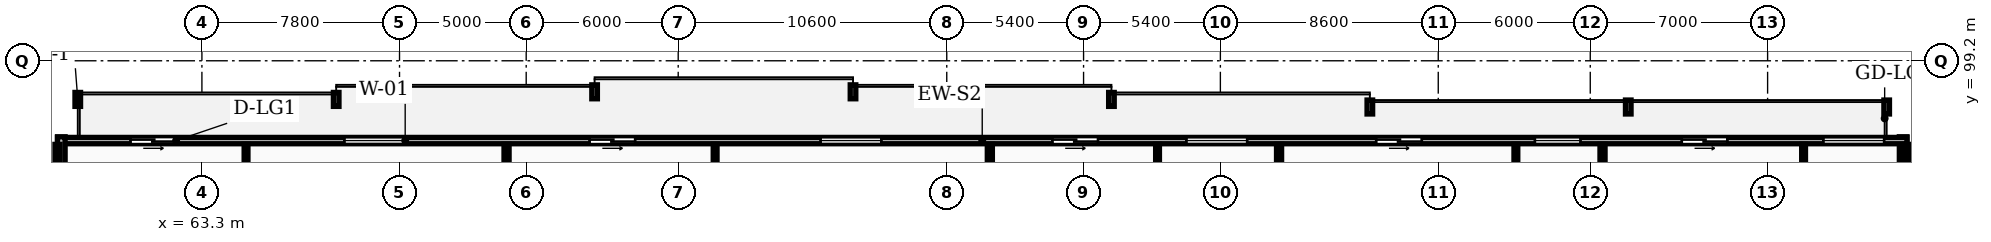
"""IFC4 building model, lengths in metres.
Left out: names, types, materials, properties, quantities, classifications, styles, units other than length and angle.
Written with IfcOpenShell. Run it as: python <this file> out.ifc"""

import sys

from ifc_helpers import new_model, si_unit, direction, frame, frame_2d, origin, place, context, subcontext, project, spatial, rectangle, extrude, element, fill, save


model = new_model("IFC4")
c1 = context("Model", 3, precision=1e-05, world=origin(), true_north=direction((0.0, 1.0)))
c2 = subcontext(c1, "Body", "Model", "MODEL_VIEW")
j1 = project(units=[si_unit("LENGTHUNIT", "METRE"), si_unit("PLANEANGLEUNIT", "RADIAN")], contexts=[c1])
p1 = place(None, origin())
s1 = spatial("IfcSite", under=j1, at=p1, CompositionType="ELEMENT")
p2 = place(p1, origin())
s2 = spatial("IfcBuilding", under=s1, at=p2, CompositionType="ELEMENT")
p3 = place(p2, frame((0.0, 0.0, 106.8)))
s3 = spatial("IfcBuildingStorey", under=s2, at=p3, CompositionType="ELEMENT", Elevation=106.8)
p4 = place(p3, frame((130.45, 92.6, 0.0), z_axis=(0.0, 0.0, 1.0), x_axis=(0.0, 1.0, 0.0)))
e1 = element("IfcWall", 1, at=p4, inside=s3, PredefinedType="STANDARD", context=c2, shape_type="SweptSolid", body=[
    extrude(rectangle(XDim=3.6, YDim=0.3, at=frame_2d((1.8, 0.0))), origin(), (0.0, 0.0, 1.0), 2.97),
])
p5 = place(p3, frame((130.6, 96.05, 0.0), z_axis=(0.0, 0.0, 1.0), x_axis=(-1.0, 0.0, 0.0)))
e2 = element("IfcWall", 2, at=p5, inside=s3, PredefinedType="STANDARD", context=c2, shape_type="SweptSolid", body=[
    extrude(rectangle(XDim=73.0, YDim=0.25, at=frame_2d((36.5, 0.0))), origin(), (0.0, 0.0, 1.0), 2.97),
])
p6 = place(p5, frame((68.319, 0.0, 0.0)))
e3 = element("IfcOpeningElement", 3, at=p6, cuts=e2, PredefinedType="OPENING", context=c2, shape_type="SweptSolid", body=[
    extrude(rectangle(XDim=1.8, YDim=2.2, at=frame_2d((0.9, 1.1))), frame((0.0, 0.135, 0.0), z_axis=(0.0, -1.0, 0.0), x_axis=(1.0, 0.0, 0.0)), (0.0, 0.0, 1.0), 0.27),
])
p7 = place(p5, frame((59.277, 0.0, 0.85)))
e4 = element("IfcOpeningElement", 4, at=p7, cuts=e2, PredefinedType="OPENING", context=c2, shape_type="SweptSolid", body=[
    extrude(rectangle(XDim=2.4, YDim=1.9, at=frame_2d((1.2, 0.95))), frame((0.0, 0.135, 0.0), z_axis=(0.0, -1.0, 0.0), x_axis=(1.0, 0.0, 0.0)), (0.0, 0.0, 1.0), 0.27),
])
p8 = place(p5, frame((50.199, 0.0, 0.0)))
e5 = element("IfcOpeningElement", 5, at=p8, cuts=e2, PredefinedType="OPENING", context=c2, shape_type="SweptSolid", body=[
    extrude(rectangle(XDim=1.8, YDim=2.2, at=frame_2d((0.9, 1.1))), frame((0.0, 0.135, 0.0), z_axis=(0.0, -1.0, 0.0), x_axis=(1.0, 0.0, 0.0)), (0.0, 0.0, 1.0), 0.27),
])
p9 = place(p5, frame((40.481, 0.0, 0.85)))
e6 = element("IfcOpeningElement", 6, at=p9, cuts=e2, PredefinedType="OPENING", context=c2, shape_type="SweptSolid", body=[
    extrude(rectangle(XDim=2.4, YDim=1.9, at=frame_2d((1.2, 0.95))), frame((0.0, 0.135, 0.0), z_axis=(0.0, -1.0, 0.0), x_axis=(1.0, 0.0, 0.0)), (0.0, 0.0, 1.0), 0.27),
])
p10 = place(p5, frame((31.93, 0.0, 0.0)))
e7 = element("IfcOpeningElement", 7, at=p10, cuts=e2, PredefinedType="OPENING", context=c2, shape_type="SweptSolid", body=[
    extrude(rectangle(XDim=1.8, YDim=2.2, at=frame_2d((0.9, 1.1))), frame((0.0, 0.135, 0.0), z_axis=(0.0, -1.0, 0.0), x_axis=(1.0, 0.0, 0.0)), (0.0, 0.0, 1.0), 0.27),
])
p11 = place(p5, frame((26.042, 0.0, 0.85)))
e8 = element("IfcOpeningElement", 8, at=p11, cuts=e2, PredefinedType="OPENING", context=c2, shape_type="SweptSolid", body=[
    extrude(rectangle(XDim=2.4, YDim=1.9, at=frame_2d((1.2, 0.95))), frame((0.0, 0.135, 0.0), z_axis=(0.0, -1.0, 0.0), x_axis=(1.0, 0.0, 0.0)), (0.0, 0.0, 1.0), 0.27),
])
p12 = place(p5, frame((19.15, 0.0, 0.0)))
e9 = element("IfcOpeningElement", 9, at=p12, cuts=e2, PredefinedType="OPENING", context=c2, shape_type="SweptSolid", body=[
    extrude(rectangle(XDim=1.8, YDim=2.2, at=frame_2d((0.9, 1.1))), frame((0.0, 0.135, 0.0), z_axis=(0.0, -1.0, 0.0), x_axis=(1.0, 0.0, 0.0)), (0.0, 0.0, 1.0), 0.27),
])
p13 = place(p5, frame((12.886, 0.0, 0.85)))
e10 = element("IfcOpeningElement", 10, at=p13, cuts=e2, PredefinedType="OPENING", context=c2, shape_type="SweptSolid", body=[
    extrude(rectangle(XDim=1.8, YDim=1.8, at=frame_2d((0.9, 0.9))), frame((0.0, 0.135, 0.0), z_axis=(0.0, -1.0, 0.0), x_axis=(1.0, 0.0, 0.0)), (0.0, 0.0, 1.0), 0.27),
])
p14 = place(p5, frame((7.088, 0.0, 0.0)))
e11 = element("IfcOpeningElement", 11, at=p14, cuts=e2, PredefinedType="OPENING", context=c2, shape_type="SweptSolid", body=[
    extrude(rectangle(XDim=1.8, YDim=2.2, at=frame_2d((0.9, 1.1))), frame((0.0, 0.135, 0.0), z_axis=(0.0, -1.0, 0.0), x_axis=(1.0, 0.0, 0.0)), (0.0, 0.0, 1.0), 0.27),
])
p15 = place(p5, frame((0.9, 0.0, 0.85)))
e12 = element("IfcOpeningElement", 12, at=p15, cuts=e2, PredefinedType="OPENING", context=c2, shape_type="SweptSolid", body=[
    extrude(rectangle(XDim=2.4, YDim=1.9, at=frame_2d((1.2, 0.95))), frame((0.0, 0.135, 0.0), z_axis=(0.0, -1.0, 0.0), x_axis=(1.0, 0.0, 0.0)), (0.0, 0.0, 1.0), 0.27),
])
p16 = place(p3, frame((57.75, 96.2, 0.0), z_axis=(0.0, 0.0, 1.0), x_axis=(0.0, -1.0, 0.0)))
e13 = element("IfcWall", 13, at=p16, inside=s3, PredefinedType="STANDARD", context=c2, shape_type="SweptSolid", body=[
    extrude(rectangle(XDim=3.6, YDim=0.3, at=frame_2d((1.8, 0.0))), origin(), (0.0, 0.0, 1.0), 2.97),
])
for number, where, z_axis, x_axis in (
    (14, (57.6, 69.83, 0.0), (0.0, 0.0, 1.0), (0.0, 1.0, 0.0)),
    (15, (130.6, 69.83, 0.0), (0.0, 0.0, 1.0), (0.0, 1.0, 0.0)),
    (16, (75.325, 69.83, 0.0), (0.0, 0.0, 1.0), (0.0, 1.0, 0.0)),
):
    element("IfcWall", number, at=place(p3, frame(where, z_axis=z_axis, x_axis=x_axis)), inside=s3, PredefinedType="PARTITIONING", context=c2, shape_type="SweptSolid", body=[
        extrude(rectangle(XDim=26.07, YDim=0.2, at=frame_2d((13.035, 0.0))), origin(), (0.0, 0.0, 1.0), 2.97),
    ])
p17 = place(p3, frame((65.042, 90.73, 0.0), z_axis=(0.0, 0.0, 1.0), x_axis=(0.0, 1.0, 0.0)))
e17 = element("IfcWall", 17, at=p17, inside=s3, PredefinedType="PARTITIONING", context=c2, shape_type="SweptSolid", body=[
    extrude(rectangle(XDim=5.17, YDim=0.15, at=frame_2d((2.585, 0.0))), origin(), (0.0, 0.0, 1.0), 2.97),
])
p18 = place(p3, frame((94.401, 69.83, 0.0), z_axis=(0.0, 0.0, 1.0), x_axis=(0.0, 1.0, 0.0)))
e18 = element("IfcWall", 18, at=p18, inside=s3, PredefinedType="PARTITIONING", context=c2, shape_type="SweptSolid", body=[
    extrude(rectangle(XDim=26.07, YDim=0.2, at=frame_2d((13.035, 0.0))), origin(), (0.0, 0.0, 1.0), 2.97),
])
p19 = place(p3, frame((83.558, 90.73, 0.0), z_axis=(0.0, 0.0, 1.0), x_axis=(0.0, 1.0, 0.0)))
e19 = element("IfcWall", 19, at=p19, inside=s3, PredefinedType="PARTITIONING", context=c2, shape_type="SweptSolid", body=[
    extrude(rectangle(XDim=5.17, YDim=0.15, at=frame_2d((2.585, 0.0))), origin(), (0.0, 0.0, 1.0), 2.97),
])
p20 = place(p3, frame((105.817, 69.83, 0.0), z_axis=(0.0, 0.0, 1.0), x_axis=(0.0, 1.0, 0.0)))
e20 = element("IfcWall", 20, at=p20, inside=s3, PredefinedType="PARTITIONING", context=c2, shape_type="SweptSolid", body=[
    extrude(rectangle(XDim=26.07, YDim=0.2, at=frame_2d((13.035, 0.0))), origin(), (0.0, 0.0, 1.0), 2.97),
])
p21 = place(p3, frame((101.02, 85.59, 0.0), z_axis=(0.0, 0.0, 1.0), x_axis=(0.0, 1.0, 0.0)))
e21 = element("IfcWall", 21, at=p21, inside=s3, PredefinedType="PARTITIONING", context=c2, shape_type="SweptSolid", body=[
    extrude(rectangle(XDim=10.31, YDim=0.15, at=frame_2d((5.155, 0.0))), origin(), (0.0, 0.0, 1.0), 2.97),
])
p22 = place(p21, frame((1.43, 0.0, 0.0)))
e22 = element("IfcOpeningElement", 22, at=p22, cuts=e21, PredefinedType="OPENING", context=c2, shape_type="SweptSolid", body=[
    extrude(rectangle(XDim=0.84, YDim=2.04, at=frame_2d((0.42, 1.02))), frame((0.0, 0.085, 0.0), z_axis=(0.0, -1.0, 0.0), x_axis=(1.0, 0.0, 0.0)), (0.0, 0.0, 1.0), 0.17),
])
p23 = place(p21, frame((3.102, 0.0, 0.0)))
e23 = element("IfcOpeningElement", 23, at=p23, cuts=e21, PredefinedType="OPENING", context=c2, shape_type="SweptSolid", body=[
    extrude(rectangle(XDim=0.84, YDim=2.04, at=frame_2d((0.42, 1.02))), frame((0.0, 0.085, 0.0), z_axis=(0.0, -1.0, 0.0), x_axis=(1.0, 0.0, 0.0)), (0.0, 0.0, 1.0), 0.17),
])
p24 = place(p21, frame((7.29, 0.0, 0.0)))
e24 = element("IfcOpeningElement", 24, at=p24, cuts=e21, PredefinedType="OPENING", context=c2, shape_type="SweptSolid", body=[
    extrude(rectangle(XDim=0.88, YDim=2.06, at=frame_2d((0.44, 1.03))), frame((0.0, 0.085, 0.0), z_axis=(0.0, -1.0, 0.0), x_axis=(1.0, 0.0, 0.0)), (0.0, 0.0, 1.0), 0.17),
])
p25 = place(p3, frame((118.584, 69.83, 0.0), z_axis=(0.0, 0.0, 1.0), x_axis=(0.0, 1.0, 0.0)))
e25 = element("IfcWall", 25, at=p25, inside=s3, PredefinedType="PARTITIONING", context=c2, shape_type="SweptSolid", body=[
    extrude(rectangle(XDim=26.07, YDim=0.2, at=frame_2d((13.035, 0.0))), origin(), (0.0, 0.0, 1.0), 2.97),
])
p26 = place(p3, frame((115.164, 85.59, 0.0), z_axis=(0.0, 0.0, 1.0), x_axis=(0.0, 1.0, 0.0)))
e26 = element("IfcWall", 26, at=p26, inside=s3, PredefinedType="PARTITIONING", context=c2, shape_type="SweptSolid", body=[
    extrude(rectangle(XDim=10.31, YDim=0.15, at=frame_2d((5.155, 0.0))), origin(), (0.0, 0.0, 1.0), 2.97),
])
p27 = place(p26, frame((1.43, 0.0, 0.0)))
e27 = element("IfcOpeningElement", 27, at=p27, cuts=e26, PredefinedType="OPENING", context=c2, shape_type="SweptSolid", body=[
    extrude(rectangle(XDim=0.84, YDim=2.04, at=frame_2d((0.42, 1.02))), frame((0.0, 0.085, 0.0), z_axis=(0.0, -1.0, 0.0), x_axis=(1.0, 0.0, 0.0)), (0.0, 0.0, 1.0), 0.17),
])
p28 = place(p26, frame((3.92, 0.0, 0.0)))
e28 = element("IfcOpeningElement", 28, at=p28, cuts=e26, PredefinedType="OPENING", context=c2, shape_type="SweptSolid", body=[
    extrude(rectangle(XDim=0.84, YDim=2.04, at=frame_2d((0.42, 1.02))), frame((0.0, 0.085, 0.0), z_axis=(0.0, -1.0, 0.0), x_axis=(1.0, 0.0, 0.0)), (0.0, 0.0, 1.0), 0.17),
])
p29 = place(p26, frame((5.48, 0.0, 0.0)))
e29 = element("IfcOpeningElement", 29, at=p29, cuts=e26, PredefinedType="OPENING", context=c2, shape_type="SweptSolid", body=[
    extrude(rectangle(XDim=0.88, YDim=2.06, at=frame_2d((0.44, 1.03))), frame((0.0, 0.085, 0.0), z_axis=(0.0, -1.0, 0.0), x_axis=(1.0, 0.0, 0.0)), (0.0, 0.0, 1.0), 0.17),
])
p30 = place(p3, frame((126.52, 85.59, 0.0), z_axis=(0.0, 0.0, 1.0), x_axis=(0.0, 1.0, 0.0)))
e30 = element("IfcWall", 30, at=p30, inside=s3, PredefinedType="PARTITIONING", context=c2, shape_type="SweptSolid", body=[
    extrude(rectangle(XDim=10.31, YDim=0.15, at=frame_2d((5.155, 0.0))), origin(), (0.0, 0.0, 1.0), 2.97),
])
p31 = place(p30, frame((1.43, 0.0, 0.0)))
e31 = element("IfcOpeningElement", 31, at=p31, cuts=e30, PredefinedType="OPENING", context=c2, shape_type="SweptSolid", body=[
    extrude(rectangle(XDim=0.84, YDim=2.04, at=frame_2d((0.42, 1.02))), frame((0.0, 0.085, 0.0), z_axis=(0.0, -1.0, 0.0), x_axis=(1.0, 0.0, 0.0)), (0.0, 0.0, 1.0), 0.17),
])
p32 = place(p30, frame((3.102, 0.0, 0.0)))
e32 = element("IfcOpeningElement", 32, at=p32, cuts=e30, PredefinedType="OPENING", context=c2, shape_type="SweptSolid", body=[
    extrude(rectangle(XDim=0.84, YDim=2.04, at=frame_2d((0.42, 1.02))), frame((0.0, 0.085, 0.0), z_axis=(0.0, -1.0, 0.0), x_axis=(1.0, 0.0, 0.0)), (0.0, 0.0, 1.0), 0.17),
])
p33 = place(p30, frame((7.29, 0.0, 0.0)))
e33 = element("IfcOpeningElement", 33, at=p33, cuts=e30, PredefinedType="OPENING", context=c2, shape_type="SweptSolid", body=[
    extrude(rectangle(XDim=0.88, YDim=2.06, at=frame_2d((0.44, 1.03))), frame((0.0, 0.085, 0.0), z_axis=(0.0, -1.0, 0.0), x_axis=(1.0, 0.0, 0.0)), (0.0, 0.0, 1.0), 0.17),
])
p34 = place(p6, origin())
e34 = element("IfcDoor", 34, at=p34, inside=s3, OperationType="SLIDING_TO_LEFT", PredefinedType="DOOR", context=c2, shape_type="SweptSolid", body=[
    extrude(rectangle(XDim=1.8, YDim=2.2, at=frame_2d((0.9, 1.1))), frame((0.0, 0.025, 0.0), z_axis=(0.0, -1.0, 0.0), x_axis=(1.0, 0.0, 0.0)), (0.0, 0.0, 1.0), 0.05),
])
fill(e3, e34)
p35 = place(p7, origin())
e35 = element("IfcWindow", 35, at=p35, inside=s3, PartitioningType="DOUBLE_PANEL_VERTICAL", PredefinedType="WINDOW", context=c2, shape_type="SweptSolid", body=[
    extrude(rectangle(XDim=2.4, YDim=1.9, at=frame_2d((1.2, 0.95))), frame((0.0, 0.03, 0.0), z_axis=(0.0, -1.0, 0.0), x_axis=(1.0, 0.0, 0.0)), (0.0, 0.0, 1.0), 0.06),
])
fill(e4, e35)
p36 = place(p8, origin())
e36 = element("IfcDoor", 36, at=p36, inside=s3, OperationType="SLIDING_TO_LEFT", PredefinedType="DOOR", context=c2, shape_type="SweptSolid", body=[
    extrude(rectangle(XDim=1.8, YDim=2.2, at=frame_2d((0.9, 1.1))), frame((0.0, 0.025, 0.0), z_axis=(0.0, -1.0, 0.0), x_axis=(1.0, 0.0, 0.0)), (0.0, 0.0, 1.0), 0.05),
])
fill(e5, e36)
p37 = place(p9, origin())
e37 = element("IfcWindow", 37, at=p37, inside=s3, PartitioningType="DOUBLE_PANEL_VERTICAL", PredefinedType="WINDOW", context=c2, shape_type="SweptSolid", body=[
    extrude(rectangle(XDim=2.4, YDim=1.9, at=frame_2d((1.2, 0.95))), frame((0.0, 0.03, 0.0), z_axis=(0.0, -1.0, 0.0), x_axis=(1.0, 0.0, 0.0)), (0.0, 0.0, 1.0), 0.06),
])
fill(e6, e37)
p38 = place(p10, origin())
e38 = element("IfcDoor", 38, at=p38, inside=s3, OperationType="SLIDING_TO_LEFT", PredefinedType="DOOR", context=c2, shape_type="SweptSolid", body=[
    extrude(rectangle(XDim=1.8, YDim=2.2, at=frame_2d((0.9, 1.1))), frame((0.0, 0.025, 0.0), z_axis=(0.0, -1.0, 0.0), x_axis=(1.0, 0.0, 0.0)), (0.0, 0.0, 1.0), 0.05),
])
fill(e7, e38)
p39 = place(p11, origin())
e39 = element("IfcWindow", 39, at=p39, inside=s3, PartitioningType="DOUBLE_PANEL_VERTICAL", PredefinedType="WINDOW", context=c2, shape_type="SweptSolid", body=[
    extrude(rectangle(XDim=2.4, YDim=1.9, at=frame_2d((1.2, 0.95))), frame((0.0, 0.03, 0.0), z_axis=(0.0, -1.0, 0.0), x_axis=(1.0, 0.0, 0.0)), (0.0, 0.0, 1.0), 0.06),
])
fill(e8, e39)
p40 = place(p12, origin())
e40 = element("IfcDoor", 40, at=p40, inside=s3, OperationType="SLIDING_TO_LEFT", PredefinedType="DOOR", context=c2, shape_type="SweptSolid", body=[
    extrude(rectangle(XDim=1.8, YDim=2.2, at=frame_2d((0.9, 1.1))), frame((0.0, 0.025, 0.0), z_axis=(0.0, -1.0, 0.0), x_axis=(1.0, 0.0, 0.0)), (0.0, 0.0, 1.0), 0.05),
])
fill(e9, e40)
p41 = place(p13, origin())
e41 = element("IfcWindow", 41, at=p41, inside=s3, PartitioningType="SINGLE_PANEL", PredefinedType="WINDOW", context=c2, shape_type="SweptSolid", body=[
    extrude(rectangle(XDim=1.8, YDim=1.8, at=frame_2d((0.9, 0.9))), frame((0.0, 0.03, 0.0), z_axis=(0.0, -1.0, 0.0), x_axis=(1.0, 0.0, 0.0)), (0.0, 0.0, 1.0), 0.06),
])
fill(e10, e41)
p42 = place(p14, origin())
e42 = element("IfcDoor", 42, at=p42, inside=s3, OperationType="SLIDING_TO_LEFT", PredefinedType="DOOR", context=c2, shape_type="SweptSolid", body=[
    extrude(rectangle(XDim=1.8, YDim=2.2, at=frame_2d((0.9, 1.1))), frame((0.0, 0.025, 0.0), z_axis=(0.0, -1.0, 0.0), x_axis=(1.0, 0.0, 0.0)), (0.0, 0.0, 1.0), 0.05),
])
fill(e11, e42)
p43 = place(p15, origin())
e43 = element("IfcWindow", 43, at=p43, inside=s3, PartitioningType="DOUBLE_PANEL_VERTICAL", PredefinedType="WINDOW", context=c2, shape_type="SweptSolid", body=[
    extrude(rectangle(XDim=2.4, YDim=1.9, at=frame_2d((1.2, 0.95))), frame((0.0, 0.03, 0.0), z_axis=(0.0, -1.0, 0.0), x_axis=(1.0, 0.0, 0.0)), (0.0, 0.0, 1.0), 0.06),
])
fill(e12, e43)
save(model, sys.argv[1])
